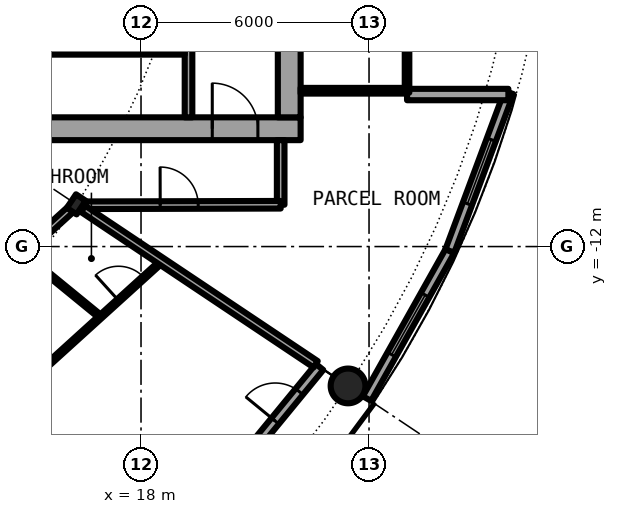
"""IFC4 building model, lengths in metres.
Left out: names, types, materials, properties, quantities, classifications, styles, units other than length and angle.
Written with IfcOpenShell. Run it as: python <this file> out.ifc"""

import sys

from ifc_helpers import new_model, si_unit, direction, frame, frame_2d, origin, origin_2d, place, context, subcontext, project, spatial, rectangle, hollow_circle, i_section, extrude, element, fill, save


model = new_model("IFC4")
c1 = context("Model", 3, precision=1e-05, world=origin(), true_north=direction((0.0, 1.0)))
c2 = subcontext(c1, "Body", "Model", "MODEL_VIEW")
j1 = project(units=[si_unit("LENGTHUNIT", "METRE"), si_unit("PLANEANGLEUNIT", "RADIAN")], contexts=[c1])
p1 = place(None, origin())
s1 = spatial("IfcSite", under=j1, at=p1, CompositionType="ELEMENT")
p2 = place(p1, origin())
s2 = spatial("IfcBuilding", under=s1, at=p2, CompositionType="ELEMENT")
p3 = place(p2, frame((0.0, 0.0, 129.95)))
s3 = spatial("IfcBuildingStorey", under=s2, at=p3, CompositionType="ELEMENT", Elevation=129.95)
p4 = place(p3, frame((23.448, -15.667, 0.0), z_axis=(0.0, 0.0, 1.0), x_axis=(1.0, 0.0, 0.0)))
e1 = element("IfcColumn", 1, at=p4, inside=s3, PredefinedType="COLUMN", context=c2, shape_type="SweptSolid", body=[
    extrude(hollow_circle(Radius=0.457, WallThickness=0.04, at=origin_2d()), origin(), (0.0, 0.0, 1.0), 3.05),
])
p5 = place(p3, frame((16.297, -10.889, 0.0), z_axis=(0.0, 0.0, 1.0), x_axis=(0.831469612303, -0.55557023302, 0.0)))
e2 = element("IfcColumn", 2, at=p5, inside=s3, PredefinedType="COLUMN", context=c2, shape_type="SweptSolid", body=[
    extrude(i_section(OverallWidth=0.307, OverallDepth=0.432, WebThickness=0.021, FlangeThickness=0.04, FilletRadius=0.027, at=origin_2d()), origin(), (0.0, 0.0, 1.0), 3.05),
])
p6 = place(p3, frame((19.304, -19.304, 0.0), z_axis=(0.0, 0.0, 1.0), x_axis=(0.634382322723, 0.773019449054, 0.0)))
e3 = element("IfcWall", 3, at=p6, inside=s3, PredefinedType="SOLIDWALL", context=c2, shape_type="SweptSolid", body=[
    extrude(rectangle(XDim=5.352, YDim=0.25, at=frame_2d((2.676, 0.0))), origin(), (0.0, 0.0, 1.0), 2.7),
])
p7 = place(p6, frame((0.441, 0.0, 0.3)))
e4 = element("IfcOpeningElement", 4, at=p7, cuts=e3, PredefinedType="OPENING", context=c2, shape_type="SweptSolid", body=[
    extrude(rectangle(XDim=1.8, YDim=2.1, at=frame_2d((0.9, 1.05))), frame((0.0, 0.135, 0.0), z_axis=(0.0, -1.0, 0.0), x_axis=(1.0, 0.0, 0.0)), (0.0, 0.0, 1.0), 0.27),
])
p8 = place(p6, frame((3.51, 0.0, 0.0)))
e5 = element("IfcOpeningElement", 5, at=p8, cuts=e3, PredefinedType="OPENING", context=c2, shape_type="SweptSolid", body=[
    extrude(rectangle(XDim=1.0, YDim=2.2, at=frame_2d((0.5, 1.1))), frame((0.0, 0.135, 0.0), z_axis=(0.0, -1.0, 0.0), x_axis=(1.0, 0.0, 0.0)), (0.0, 0.0, 1.0), 0.27),
])
p9 = place(p3, frame((23.946, -16.0, 0.0), z_axis=(0.0, 0.0, 1.0), x_axis=(0.489696356642, 0.871893042919, 0.0)))
e6 = element("IfcWall", 6, at=p9, inside=s3, PredefinedType="SOLIDWALL", context=c2, shape_type="SweptSolid", body=[
    extrude(rectangle(XDim=4.454, YDim=0.25, at=frame_2d((2.227, 0.0))), origin(), (0.0, 0.0, 1.0), 2.7),
])
p10 = place(p9, frame((1.327, 0.0, 0.3)))
e7 = element("IfcOpeningElement", 7, at=p10, cuts=e6, PredefinedType="OPENING", context=c2, shape_type="SweptSolid", body=[
    extrude(rectangle(XDim=1.8, YDim=2.1, at=frame_2d((0.9, 1.05))), frame((0.0, 0.135, 0.0), z_axis=(0.0, -1.0, 0.0), x_axis=(1.0, 0.0, 0.0)), (0.0, 0.0, 1.0), 0.27),
])
p11 = place(p3, frame((26.127, -12.117, 0.0), z_axis=(0.0, 0.0, 1.0), x_axis=(0.349247811493, 0.937030397675, 0.0)))
e8 = element("IfcWall", 8, at=p11, inside=s3, PredefinedType="SOLIDWALL", context=c2, shape_type="SweptSolid", body=[
    extrude(rectangle(XDim=4.452, YDim=0.25, at=frame_2d((2.226, 0.0))), origin(), (0.0, 0.0, 1.0), 2.7),
])
p12 = place(p11, frame((1.327, 0.0, 0.3)))
e9 = element("IfcOpeningElement", 9, at=p12, cuts=e8, PredefinedType="OPENING", context=c2, shape_type="SweptSolid", body=[
    extrude(rectangle(XDim=1.8, YDim=2.1, at=frame_2d((0.9, 1.05))), frame((0.0, 0.135, 0.0), z_axis=(0.0, -1.0, 0.0), x_axis=(1.0, 0.0, 0.0)), (0.0, 0.0, 1.0), 0.27),
])
p13 = place(p3, frame((25.0, -8.0, 0.0), z_axis=(0.0, 0.0, 1.0), x_axis=(1.0, 0.0, 0.0)))
e10 = element("IfcWall", 10, at=p13, inside=s3, PredefinedType="SOLIDWALL", context=c2, shape_type="SweptSolid", body=[
    extrude(rectangle(XDim=2.667, YDim=0.3, at=frame_2d((1.333, 0.0))), origin(), (0.0, 0.0, 1.0), 2.7),
])
p14 = place(p3, frame((8.4, -8.9, 0.0), z_axis=(0.0, 0.0, 1.0), x_axis=(1.0, 0.0, 0.0)))
e11 = element("IfcWall", 11, at=p14, inside=s3, PredefinedType="SHEAR", context=c2, shape_type="SweptSolid", body=[
    extrude(rectangle(XDim=13.8, YDim=0.6, at=frame_2d((6.9, 0.0))), origin(), (0.0, 0.0, 1.0), 3.05),
])
p15 = place(p14, frame((11.475, 0.0, 0.0)))
e12 = element("IfcOpeningElement", 12, at=p15, cuts=e11, PredefinedType="OPENING", context=c2, shape_type="SweptSolid", body=[
    extrude(rectangle(XDim=1.2, YDim=2.3, at=frame_2d((0.6, 1.15))), frame((0.0, 0.31, 0.0), z_axis=(0.0, -1.0, 0.0), x_axis=(1.0, 0.0, 0.0)), (0.0, 0.0, 1.0), 0.62),
])
p16 = place(p3, frame((21.9, 8.6, 0.0), z_axis=(0.0, 0.0, 1.0), x_axis=(0.0, -1.0, 0.0)))
e13 = element("IfcWall", 13, at=p16, inside=s3, PredefinedType="SHEAR", context=c2, shape_type="SweptSolid", body=[
    extrude(rectangle(XDim=17.2, YDim=0.6, at=frame_2d((8.6, 0.0))), origin(), (0.0, 0.0, 1.0), 3.05),
])
p17 = place(p16, frame((7.7, 0.0, 0.0)))
e14 = element("IfcOpeningElement", 14, at=p17, cuts=e13, PredefinedType="OPENING", context=c2, shape_type="SweptSolid", body=[
    extrude(rectangle(XDim=1.8, YDim=2.3, at=frame_2d((0.9, 1.15))), frame((0.0, 0.31, 0.0), z_axis=(0.0, -1.0, 0.0), x_axis=(1.0, 0.0, 0.0)), (0.0, 0.0, 1.0), 0.62),
])
p18 = place(p3, frame((19.25, -8.6, 0.0), z_axis=(0.0, 0.0, 1.0), x_axis=(0.0, 1.0, 0.0)))
e15 = element("IfcWall", 15, at=p18, inside=s3, PredefinedType="SOLIDWALL", context=c2, shape_type="SweptSolid", body=[
    extrude(rectangle(XDim=7.025, YDim=0.2, at=frame_2d((3.513, 0.0))), origin(), (0.0, 0.0, 1.0), 2.7),
])
p19 = place(p18, frame((2.35, 0.0, 0.0)))
e16 = element("IfcOpeningElement", 16, at=p19, cuts=e15, PredefinedType="OPENING", context=c2, shape_type="SweptSolid", body=[
    extrude(rectangle(XDim=1.1, YDim=2.3, at=frame_2d((0.55, 1.15))), frame((0.0, 0.11, 0.0), z_axis=(0.0, -1.0, 0.0), x_axis=(1.0, 0.0, 0.0)), (0.0, 0.0, 1.0), 0.22),
])
p20 = place(p3, frame((15.45, -6.875, 0.0), z_axis=(0.0, 0.0, 1.0), x_axis=(1.0, 0.0, 0.0)))
e17 = element("IfcWall", 17, at=p20, inside=s3, PredefinedType="PARTITIONING", context=c2, shape_type="SweptSolid", body=[
    extrude(rectangle(XDim=3.7, YDim=0.15, at=frame_2d((1.85, 0.0))), origin(), (0.0, 0.0, 1.0), 2.7),
])
p21 = place(p20, frame((1.4, 0.0, 0.0)))
e18 = element("IfcOpeningElement", 18, at=p21, cuts=e17, PredefinedType="OPENING", context=c2, shape_type="SweptSolid", body=[
    extrude(rectangle(XDim=0.9, YDim=2.3, at=frame_2d((0.45, 1.15))), frame((0.0, 0.085, 0.0), z_axis=(0.0, -1.0, 0.0), x_axis=(1.0, 0.0, 0.0)), (0.0, 0.0, 1.0), 0.17),
])
p22 = place(p3, frame((22.2, -7.9, 0.0), z_axis=(0.0, 0.0, 1.0), x_axis=(1.0, 0.0, 0.0)))
e19 = element("IfcWall", 19, at=p22, inside=s3, PredefinedType="PARTITIONING", context=c2, shape_type="SweptSolid", body=[
    extrude(rectangle(XDim=2.74, YDim=0.15, at=frame_2d((1.37, 0.0))), origin(), (0.0, 0.0, 1.0), 2.7),
])
p23 = place(p3, frame((25.0, -7.95, 0.0), z_axis=(0.0, 0.0, 1.0), x_axis=(0.0, 1.0, 0.0)))
e20 = element("IfcWall", 20, at=p23, inside=s3, PredefinedType="PARTITIONING", context=c2, shape_type="SweptSolid", body=[
    extrude(rectangle(XDim=15.9, YDim=0.12, at=frame_2d((7.95, 0.0))), origin(), (0.0, 0.0, 1.0), 2.7),
])
p24 = place(p23, frame((0.95, 0.0, 0.1)))
e21 = element("IfcOpeningElement", 21, at=p24, cuts=e20, PredefinedType="OPENING", context=c2, shape_type="SweptSolid", body=[
    extrude(rectangle(XDim=14.0, YDim=2.35, at=frame_2d((7.0, 1.175))), frame((0.0, 0.07, 0.0), z_axis=(0.0, -1.0, 0.0), x_axis=(1.0, 0.0, 0.0)), (0.0, 0.0, 1.0), 0.14),
])
p25 = place(p3, frame((21.675, -10.9, 0.0), z_axis=(0.0, 0.0, 1.0), x_axis=(0.0, 1.0, 0.0)))
e22 = element("IfcWall", 22, at=p25, inside=s3, PredefinedType="PARTITIONING", context=c2, shape_type="SweptSolid", body=[
    extrude(rectangle(XDim=1.7, YDim=0.2, at=frame_2d((0.85, 0.0))), origin(), (0.0, 0.0, 1.0), 2.7),
])
p26 = place(p3, frame((15.336, -15.296, 0.0), z_axis=(0.0, 0.0, 1.0), x_axis=(0.740895789277, 0.671620003746, 0.0)))
e23 = element("IfcWall", 23, at=p26, inside=s3, PredefinedType="PARTITIONING", context=c2, shape_type="SweptSolid", body=[
    extrude(rectangle(XDim=4.331, YDim=0.1, at=frame_2d((2.166, 0.0))), origin(), (0.0, 0.0, 1.0), 2.7),
])
p27 = place(p26, frame((2.796, 0.0, 0.0)))
e24 = element("IfcOpeningElement", 24, at=p27, cuts=e23, PredefinedType="OPENING", context=c2, shape_type="SweptSolid", body=[
    extrude(rectangle(XDim=0.9, YDim=2.3, at=frame_2d((0.45, 1.15))), frame((0.0, 0.06, 0.0), z_axis=(0.0, -1.0, 0.0), x_axis=(1.0, 0.0, 0.0)), (0.0, 0.0, 1.0), 0.12),
])
p28 = place(p3, frame((13.545, -13.384, 0.0), z_axis=(0.0, 0.0, 1.0), x_axis=(0.740607766684, 0.671937598239, 0.0)))
e25 = element("IfcWall", 25, at=p28, inside=s3, PredefinedType="PARTITIONING", context=c2, shape_type="SweptSolid", body=[
    extrude(rectangle(XDim=3.555, YDim=0.2, at=frame_2d((1.778, 0.0))), origin(), (0.0, 0.0, 1.0), 2.39),
])
p29 = place(p3, frame((16.54, -10.913, 0.0), z_axis=(0.0, 0.0, 1.0), x_axis=(0.99999670426, 0.002567385634, 0.0)))
e26 = element("IfcWall", 26, at=p29, inside=s3, PredefinedType="PARTITIONING", context=c2, shape_type="SweptSolid", body=[
    extrude(rectangle(XDim=5.135, YDim=0.2, at=frame_2d((2.567, 0.0))), origin(), (0.0, 0.0, 1.0), 2.7),
])
p30 = place(p29, frame((1.965, 0.0, 0.0)))
e27 = element("IfcOpeningElement", 27, at=p30, cuts=e26, PredefinedType="OPENING", context=c2, shape_type="SweptSolid", body=[
    extrude(rectangle(XDim=1.0, YDim=2.3, at=frame_2d((0.5, 1.15))), frame((0.0, 0.11, 0.0), z_axis=(0.0, -1.0, 0.0), x_axis=(1.0, 0.0, 0.0)), (0.0, 0.0, 1.0), 0.22),
])
p31 = place(p3, frame((12.062, -14.727, 0.0), z_axis=(0.0, 0.0, 1.0), x_axis=(0.633664062855, -0.773608334654, 0.0)))
e28 = element("IfcWall", 28, at=p31, inside=s3, PredefinedType="PARTITIONING", context=c2, shape_type="SweptSolid", body=[
    extrude(rectangle(XDim=8.138, YDim=0.1, at=frame_2d((4.069, 0.0))), origin(), (0.0, 0.0, 1.0), 2.7),
])
p32 = place(p31, frame((0.861, 0.0, 0.0)))
e29 = element("IfcOpeningElement", 29, at=p32, cuts=e28, PredefinedType="OPENING", context=c2, shape_type="SweptSolid", body=[
    extrude(rectangle(XDim=0.9, YDim=2.3, at=frame_2d((0.45, 1.15))), frame((0.0, 0.06, 0.0), z_axis=(0.0, -1.0, 0.0), x_axis=(1.0, 0.0, 0.0)), (0.0, 0.0, 1.0), 0.12),
])
p33 = place(p31, frame((4.931, 0.0, 0.0)))
e30 = element("IfcOpeningElement", 30, at=p33, cuts=e28, PredefinedType="OPENING", context=c2, shape_type="SweptSolid", body=[
    extrude(rectangle(XDim=0.9, YDim=2.3, at=frame_2d((0.45, 1.15))), frame((0.0, 0.06, 0.0), z_axis=(0.0, -1.0, 0.0), x_axis=(1.0, 0.0, 0.0)), (0.0, 0.0, 1.0), 0.12),
])
p34 = place(p3, frame((14.882, -12.171, 0.0), z_axis=(0.0, 0.0, 1.0), x_axis=(0.774162545943, -0.632986850147, 0.0)))
e31 = element("IfcWall", 31, at=p34, inside=s3, PredefinedType="PARTITIONING", context=c2, shape_type="SweptSolid", body=[
    extrude(rectangle(XDim=2.649, YDim=0.1, at=frame_2d((1.325, 0.0))), origin(), (0.0, 0.0, 1.0), 2.7),
])
p35 = place(p3, frame((16.477, -11.009, 0.0), z_axis=(0.0, 0.0, 1.0), x_axis=(0.831467903109, -0.555572791, 0.0)))
e32 = element("IfcWall", 32, at=p35, inside=s3, PredefinedType="PARTITIONING", context=c2, shape_type="SweptSolid", body=[
    extrude(rectangle(XDim=7.358, YDim=0.2, at=frame_2d((3.679, 0.0))), origin(), (0.0, 0.0, 1.0), 2.7),
])
p36 = place(p8, origin())
e33 = element("IfcDoor", 33, at=p36, inside=s3, OperationType="SINGLE_SWING_LEFT", PredefinedType="DOOR", context=c2, shape_type="SweptSolid", body=[
    extrude(rectangle(XDim=1.0, YDim=2.2, at=frame_2d((0.5, 1.1))), frame((0.0, 0.025, 0.0), z_axis=(0.0, -1.0, 0.0), x_axis=(1.0, 0.0, 0.0)), (0.0, 0.0, 1.0), 0.05),
])
fill(e5, e33)
p37 = place(p10, origin())
e34 = element("IfcWindow", 34, at=p37, inside=s3, PartitioningType="SINGLE_PANEL", PredefinedType="WINDOW", context=c2, shape_type="SweptSolid", body=[
    extrude(rectangle(XDim=1.8, YDim=2.1, at=frame_2d((0.9, 1.05))), frame((0.0, 0.03, 0.0), z_axis=(0.0, -1.0, 0.0), x_axis=(1.0, 0.0, 0.0)), (0.0, 0.0, 1.0), 0.06),
])
fill(e7, e34)
p38 = place(p12, origin())
e35 = element("IfcWindow", 35, at=p38, inside=s3, PartitioningType="SINGLE_PANEL", PredefinedType="WINDOW", context=c2, shape_type="SweptSolid", body=[
    extrude(rectangle(XDim=1.8, YDim=2.1, at=frame_2d((0.9, 1.05))), frame((0.0, 0.03, 0.0), z_axis=(0.0, -1.0, 0.0), x_axis=(1.0, 0.0, 0.0)), (0.0, 0.0, 1.0), 0.06),
])
fill(e9, e35)
p39 = place(p21, origin())
e36 = element("IfcDoor", 36, at=p39, inside=s3, OperationType="SINGLE_SWING_LEFT", PredefinedType="DOOR", context=c2, shape_type="SweptSolid", body=[
    extrude(rectangle(XDim=0.9, YDim=2.3, at=frame_2d((0.45, 1.15))), frame((0.0, 0.025, 0.0), z_axis=(0.0, -1.0, 0.0), x_axis=(1.0, 0.0, 0.0)), (0.0, 0.0, 1.0), 0.05),
])
fill(e18, e36)
p40 = place(p15, origin())
e37 = element("IfcDoor", 37, at=p40, inside=s3, OperationType="SINGLE_SWING_LEFT", PredefinedType="DOOR", context=c2, shape_type="SweptSolid", body=[
    extrude(rectangle(XDim=1.2, YDim=2.3, at=frame_2d((0.6, 1.15))), frame((0.0, 0.025, 0.0), z_axis=(0.0, -1.0, 0.0), x_axis=(1.0, 0.0, 0.0)), (0.0, 0.0, 1.0), 0.05),
])
fill(e12, e37)
p41 = place(p24, origin())
e38 = element("IfcWindow", 38, at=p41, inside=s3, PartitioningType="SINGLE_PANEL", PredefinedType="WINDOW", context=c2, shape_type="SweptSolid", body=[
    extrude(rectangle(XDim=14.0, YDim=2.35, at=frame_2d((7.0, 1.175))), frame((0.0, 0.03, 0.0), z_axis=(0.0, -1.0, 0.0), x_axis=(1.0, 0.0, 0.0)), (0.0, 0.0, 1.0), 0.06),
])
fill(e21, e38)
p42 = place(p27, origin())
e39 = element("IfcDoor", 39, at=p42, inside=s3, OperationType="SINGLE_SWING_RIGHT", PredefinedType="DOOR", context=c2, shape_type="SweptSolid", body=[
    extrude(rectangle(XDim=0.9, YDim=2.3, at=frame_2d((0.45, 1.15))), frame((0.0, 0.025, 0.0), z_axis=(0.0, -1.0, 0.0), x_axis=(1.0, 0.0, 0.0)), (0.0, 0.0, 1.0), 0.05),
])
fill(e24, e39)
p43 = place(p30, origin())
e40 = element("IfcDoor", 40, at=p43, inside=s3, OperationType="SINGLE_SWING_LEFT", PredefinedType="DOOR", context=c2, shape_type="SweptSolid", body=[
    extrude(rectangle(XDim=1.0, YDim=2.3, at=frame_2d((0.5, 1.15))), frame((0.0, 0.025, 0.0), z_axis=(0.0, -1.0, 0.0), x_axis=(1.0, 0.0, 0.0)), (0.0, 0.0, 1.0), 0.05),
])
fill(e27, e40)
save(model, sys.argv[1])
